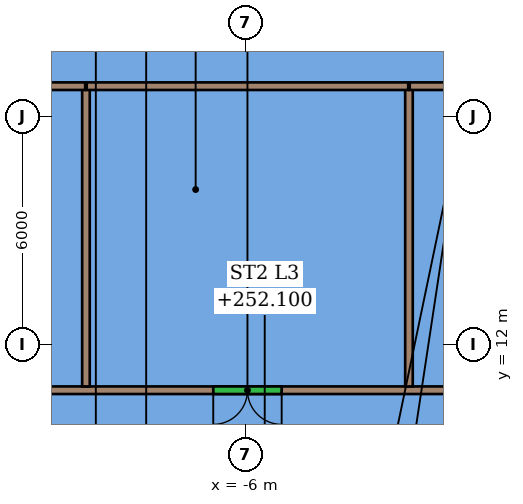
"""IFC4 building model, lengths in metres.
Left out: names, types, materials, properties, quantities, classifications, styles, units other than length and angle.
Written with IfcOpenShell. Run it as: python <this file> out.ifc"""

import sys

from ifc_helpers import new_model, si_unit, direction, frame, frame_2d, origin, place, context, subcontext, project, spatial, rectangle, extrude, element, fill, save


model = new_model("IFC4")
c1 = context("Model", 3, precision=1e-05, world=origin(), true_north=direction((0.0, 1.0)))
c2 = subcontext(c1, "Body", "Model", "MODEL_VIEW")
j1 = project(units=[si_unit("LENGTHUNIT", "METRE"), si_unit("PLANEANGLEUNIT", "RADIAN")], contexts=[c1])
p1 = place(None, origin())
s1 = spatial("IfcSite", under=j1, at=p1, CompositionType="ELEMENT")
p2 = place(p1, origin())
s2 = spatial("IfcBuilding", under=s1, at=p2, CompositionType="ELEMENT")
p3 = place(p2, frame((0.0, 0.0, 246.1)))
s3 = spatial("IfcBuildingStorey", under=s2, at=p3, CompositionType="ELEMENT", Elevation=246.1)
p4 = place(p3, frame((7.3, 10.8, 0.0), z_axis=(0.0, 0.0, 1.0), x_axis=(-1.0, 0.0, 0.0)))
e1 = element("IfcWall", 1, at=p4, inside=s3, PredefinedType="PARTITIONING", context=c2, shape_type="SweptSolid", body=[
    extrude(rectangle(XDim=26.6, YDim=0.2, at=frame_2d((13.3, 0.0))), origin(), (0.0, 0.0, 1.0), 7.5),
])
p5 = place(p4, frame((23.414, 0.0, 0.0)))
e2 = element("IfcOpeningElement", 2, at=p5, cuts=e1, PredefinedType="OPENING", context=c2, shape_type="SweptSolid", body=[
    extrude(rectangle(XDim=1.8, YDim=2.4, at=frame_2d((0.9, 1.2))), frame((0.0, 0.11, 0.0), z_axis=(0.0, -1.0, 0.0), x_axis=(1.0, 0.0, 0.0)), (0.0, 0.0, 1.0), 0.22),
])
p6 = place(p4, frame((12.35, 0.0, 0.0)))
e3 = element("IfcOpeningElement", 3, at=p6, cuts=e1, PredefinedType="OPENING", context=c2, shape_type="SweptSolid", body=[
    extrude(rectangle(XDim=1.8, YDim=2.4, at=frame_2d((0.9, 1.2))), frame((0.0, 0.11, 0.0), z_axis=(0.0, -1.0, 0.0), x_axis=(1.0, 0.0, 0.0)), (0.0, 0.0, 1.0), 0.22),
])
p7 = place(p4, frame((3.65, 0.0, 0.0)))
e4 = element("IfcOpeningElement", 4, at=p7, cuts=e1, PredefinedType="OPENING", context=c2, shape_type="SweptSolid", body=[
    extrude(rectangle(XDim=1.8, YDim=2.4, at=frame_2d((0.9, 1.2))), frame((0.0, 0.11, 0.0), z_axis=(0.0, -1.0, 0.0), x_axis=(1.0, 0.0, 0.0)), (0.0, 0.0, 1.0), 0.22),
])
for number, where, z_axis, x_axis in (
    (5, (-10.2, 10.9, 0.0), (0.0, 0.0, 1.0), (0.0, 1.0, 0.0)),
    (6, (-1.7, 10.9, 0.0), (0.0, 0.0, 1.0), (0.0, 1.0, 0.0)),
):
    element("IfcWall", number, at=place(p3, frame(where, z_axis=z_axis, x_axis=x_axis)), inside=s3, PredefinedType="PARTITIONING", context=c2, shape_type="SweptSolid", body=[
        extrude(rectangle(XDim=7.9, YDim=0.2, at=frame_2d((3.95, 0.0))), origin(), (0.0, 0.0, 1.0), 7.5),
    ])
p8 = place(p3, frame((-17.062, 18.8, 0.0), z_axis=(0.0, 0.0, 1.0), x_axis=(1.0, 0.0, 0.0)))
e7 = element("IfcWall", 7, at=p8, inside=s3, PredefinedType="PARTITIONING", context=c2, shape_type="SweptSolid", body=[
    extrude(rectangle(XDim=6.842, YDim=0.2, at=frame_2d((3.421, 0.0))), origin(), (0.0, 0.0, 1.0), 7.5),
])
p9 = place(p3, frame((-10.18, 18.8, 0.0), z_axis=(0.0, 0.0, 1.0), x_axis=(1.0, 0.0, 0.0)))
e8 = element("IfcWall", 8, at=p9, inside=s3, PredefinedType="PARTITIONING", context=c2, shape_type="SweptSolid", body=[
    extrude(rectangle(XDim=8.46, YDim=0.2, at=frame_2d((4.23, 0.0))), origin(), (0.0, 0.0, 1.0), 7.5),
])
p10 = place(p3, frame((-1.68, 18.8, 0.0), z_axis=(0.0, 0.0, 1.0), x_axis=(1.0, 0.0, 0.0)))
e9 = element("IfcWall", 9, at=p10, inside=s3, PredefinedType="PARTITIONING", context=c2, shape_type="SweptSolid", body=[
    extrude(rectangle(XDim=8.98, YDim=0.2, at=frame_2d((4.49, 0.0))), origin(), (0.0, 0.0, 1.0), 7.5),
])
p11 = place(p6, origin())
e10 = element("IfcDoor", 10, at=p11, inside=s3, OperationType="DOUBLE_DOOR_SINGLE_SWING", PredefinedType="DOOR", context=c2, shape_type="SweptSolid", body=[
    extrude(rectangle(XDim=1.8, YDim=2.4, at=frame_2d((0.9, 1.2))), frame((0.0, 0.025, 0.0), z_axis=(0.0, -1.0, 0.0), x_axis=(1.0, 0.0, 0.0)), (0.0, 0.0, 1.0), 0.05),
])
fill(e3, e10)
save(model, sys.argv[1])
